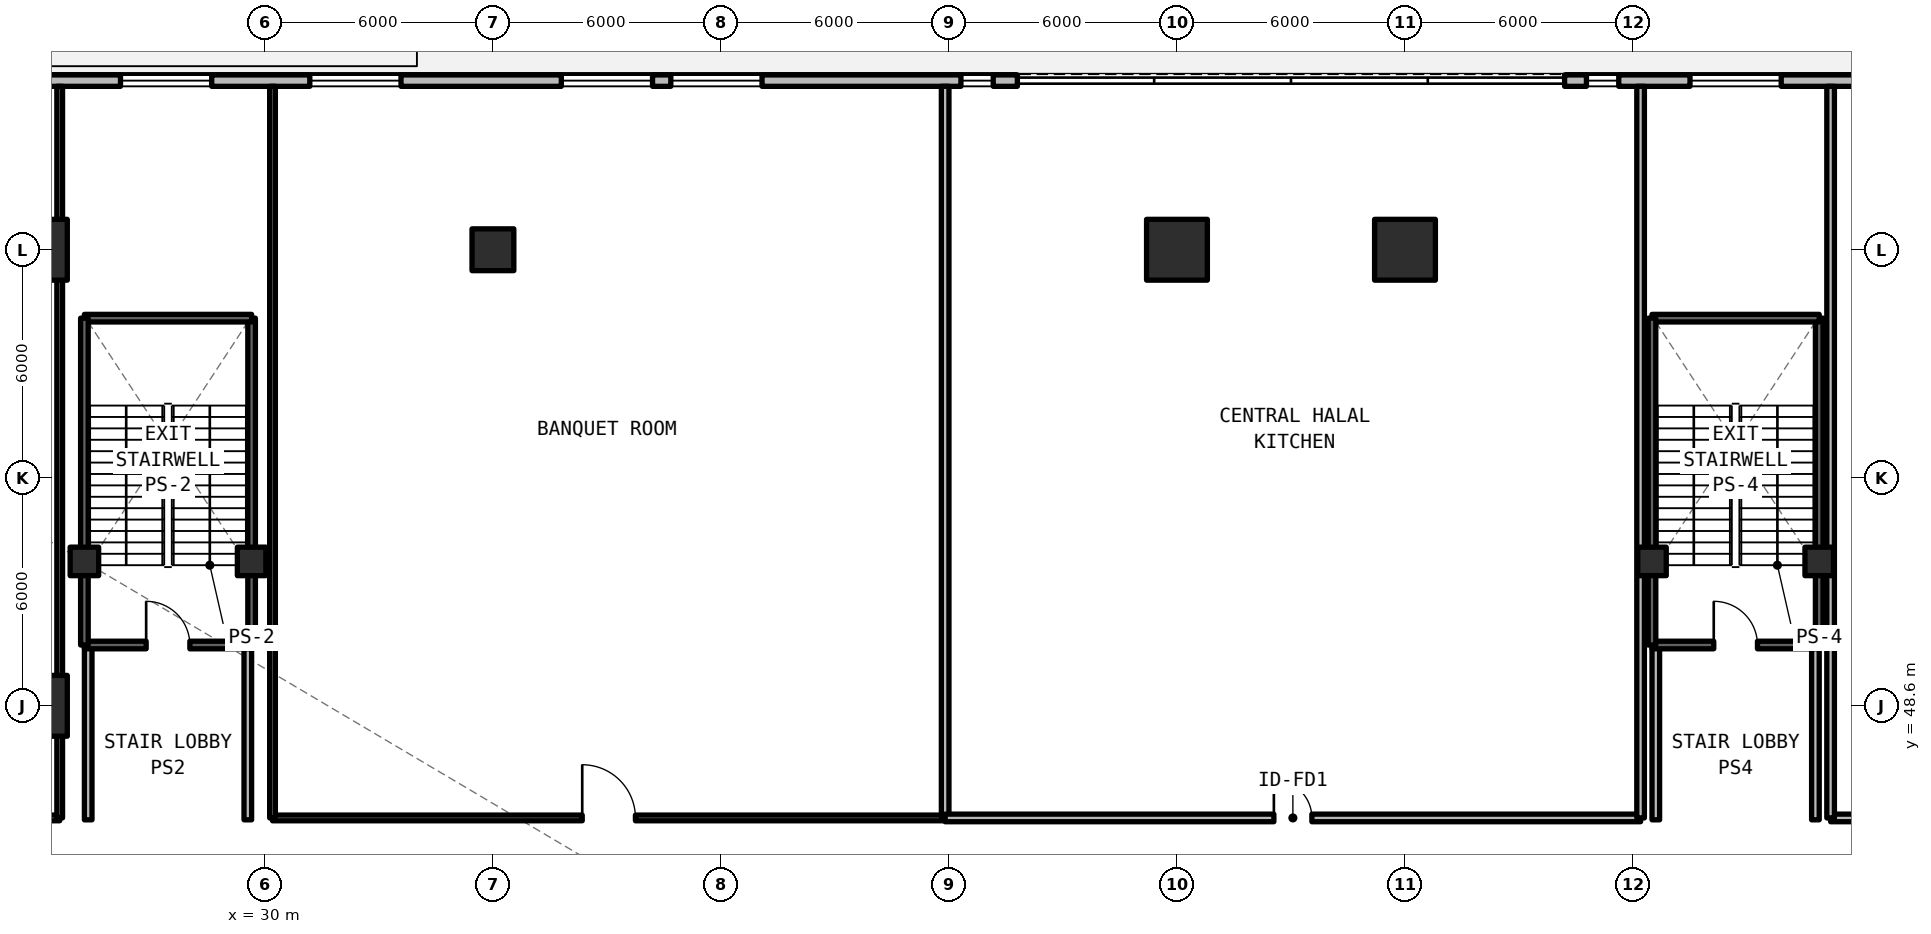
"""IFC4 building model, lengths in metres.
Left out: names, types, materials, properties, quantities, classifications, styles, units other than length and angle.
Written with IfcOpenShell. Run it as: python <this file> out.ifc"""

import sys

from ifc_helpers import new_model, si_unit, direction, frame, frame_2d, origin, origin_2d, place, context, subcontext, project, spatial, rectangle, circle, extrude, element, fill, save


model = new_model("IFC4")
c1 = context("Model", 3, precision=1e-05, world=origin(), true_north=direction((0.0, 1.0)))
c2 = subcontext(c1, "Body", "Model", "MODEL_VIEW")
j1 = project(units=[si_unit("LENGTHUNIT", "METRE"), si_unit("PLANEANGLEUNIT", "RADIAN")], contexts=[c1])
p1 = place(None, origin())
s1 = spatial("IfcSite", under=j1, at=p1, CompositionType="ELEMENT")
p2 = place(p1, origin())
s2 = spatial("IfcBuilding", under=s1, at=p2, CompositionType="ELEMENT")
p3 = place(p2, frame((0.0, 0.0, 9.9)))
s3 = spatial("IfcBuildingStorey", under=s2, at=p3, CompositionType="ELEMENT", Elevation=9.9)
p4 = place(p3, frame((24.0, 60.6, 0.0), z_axis=(0.0, 0.0, 1.0), x_axis=(1.0, 0.0, 0.0)))
e1 = element("IfcColumn", 1, at=p4, inside=s3, PredefinedType="COLUMN", context=c2, shape_type="SweptSolid", body=[
    extrude(rectangle(XDim=1.6, YDim=1.6, at=origin_2d()), origin(), (0.0, 0.0, 1.0), 4.95),
])
p5 = place(p3, frame((36.0, 60.6, 0.0), z_axis=(0.0, 0.0, 1.0), x_axis=(1.0, 0.0, 0.0)))
e2 = element("IfcColumn", 2, at=p5, inside=s3, PredefinedType="COLUMN", context=c2, shape_type="SweptSolid", body=[
    extrude(circle(Radius=0.55, at=origin_2d()), origin(), (0.0, 0.0, 1.0), 4.95),
])
for number, where, z_axis, x_axis in (
    (3, (54.0, 60.6, 0.0), (0.0, 0.0, 1.0), (1.0, 0.0, 0.0)),
    (4, (60.0, 60.6, 0.0), (0.0, 0.0, 1.0), (1.0, 0.0, 0.0)),
    (5, (24.0, 48.6, 0.0), (0.0, 0.0, 1.0), (1.0, 0.0, 0.0)),
):
    element("IfcColumn", number, at=place(p3, frame(where, z_axis=z_axis, x_axis=x_axis)), inside=s3, PredefinedType="COLUMN", context=c2, shape_type="SweptSolid", body=[
        extrude(rectangle(XDim=1.6, YDim=1.6, at=origin_2d()), origin(), (0.0, 0.0, 1.0), 4.95),
    ])
for number, where, z_axis, x_axis in (
    (6, (25.25, 52.4, 0.0), (0.0, 0.0, 1.0), (1.0, 0.0, 0.0)),
    (7, (29.65, 52.4, 0.0), (0.0, 0.0, 1.0), (1.0, 0.0, 0.0)),
    (8, (66.5, 52.4, 0.0), (0.0, 0.0, 1.0), (1.0, 0.0, 0.0)),
    (9, (70.9, 52.4, 0.0), (0.0, 0.0, 1.0), (1.0, 0.0, 0.0)),
):
    element("IfcColumn", number, at=place(p3, frame(where, z_axis=z_axis, x_axis=x_axis)), inside=s3, PredefinedType="COLUMN", context=c2, shape_type="SweptSolid", body=[
        extrude(rectangle(XDim=0.75, YDim=0.75, at=origin_2d()), origin(), (0.0, 0.0, 1.0), 4.95),
    ])
p6 = place(p3, frame((108.538, 65.05, 0.0), z_axis=(0.0, 0.0, 1.0), x_axis=(-1.0, 0.0, 0.0)))
e10 = element("IfcWall", 10, at=p6, inside=s3, PredefinedType="SOLIDWALL", context=c2, shape_type="SweptSolid", body=[
    extrude(rectangle(XDim=44.338, YDim=0.3, at=frame_2d((22.169, 0.0))), origin(), (0.0, 0.0, 1.0), 4.67),
])
p7 = place(p6, frame((7.75, 0.0, 0.0)))
e11 = element("IfcOpeningElement", 11, at=p7, cuts=e10, PredefinedType="OPENING", context=c2, shape_type="SweptSolid", body=[
    extrude(rectangle(XDim=1.5, YDim=2.2, at=frame_2d((0.75, 1.1))), frame((0.0, 0.16, 0.0), z_axis=(0.0, -1.0, 0.0), x_axis=(1.0, 0.0, 0.0)), (0.0, 0.0, 1.0), 0.32),
])
p8 = place(p6, frame((42.913, 0.0, 0.78)))
e12 = element("IfcOpeningElement", 12, at=p8, cuts=e10, PredefinedType="OPENING", context=c2, shape_type="SweptSolid", body=[
    extrude(rectangle(XDim=0.85, YDim=1.65, at=frame_2d((0.425, 0.825))), frame((0.0, 0.16, 0.0), z_axis=(0.0, -1.0, 0.0), x_axis=(1.0, 0.0, 0.0)), (0.0, 0.0, 1.0), 0.32),
])
p9 = place(p6, frame((29.738, 0.0, 0.78)))
e13 = element("IfcOpeningElement", 13, at=p9, cuts=e10, PredefinedType="OPENING", context=c2, shape_type="SweptSolid", body=[
    extrude(rectangle(XDim=2.4, YDim=1.66, at=frame_2d((1.2, 0.83))), frame((0.0, 0.16, 0.0), z_axis=(0.0, -1.0, 0.0), x_axis=(1.0, 0.0, 0.0)), (0.0, 0.0, 1.0), 0.32),
])
p10 = place(p6, frame((38.638, 0.0, 0.78)))
e14 = element("IfcOpeningElement", 14, at=p10, cuts=e10, PredefinedType="OPENING", context=c2, shape_type="SweptSolid", body=[
    extrude(rectangle(XDim=2.4, YDim=1.66, at=frame_2d((1.2, 0.83))), frame((0.0, 0.16, 0.0), z_axis=(0.0, -1.0, 0.0), x_axis=(1.0, 0.0, 0.0)), (0.0, 0.0, 1.0), 0.32),
])
p11 = place(p6, frame((16.219, 0.0, 0.78)))
e15 = element("IfcOpeningElement", 15, at=p11, cuts=e10, PredefinedType="OPENING", context=c2, shape_type="SweptSolid", body=[
    extrude(rectangle(XDim=2.4, YDim=1.66, at=frame_2d((1.2, 0.83))), frame((0.0, 0.16, 0.0), z_axis=(0.0, -1.0, 0.0), x_axis=(1.0, 0.0, 0.0)), (0.0, 0.0, 1.0), 0.32),
])
p12 = place(p6, frame((25.719, 0.0, 0.78)))
e16 = element("IfcOpeningElement", 16, at=p12, cuts=e10, PredefinedType="OPENING", context=c2, shape_type="SweptSolid", body=[
    extrude(rectangle(XDim=2.4, YDim=1.66, at=frame_2d((1.2, 0.83))), frame((0.0, 0.16, 0.0), z_axis=(0.0, -1.0, 0.0), x_axis=(1.0, 0.0, 0.0)), (0.0, 0.0, 1.0), 0.32),
])
p13 = place(p3, frame((49.8, 65.05, 0.0), z_axis=(0.0, 0.0, 1.0), x_axis=(-1.0, 0.0, 0.0)))
e17 = element("IfcWall", 17, at=p13, inside=s3, PredefinedType="SOLIDWALL", context=c2, shape_type="SweptSolid", body=[
    extrude(rectangle(XDim=44.338, YDim=0.3, at=frame_2d((22.169, 0.0))), origin(), (0.0, 0.0, 1.0), 4.67),
])
p14 = place(p13, frame((9.6, 0.0, 0.78)))
e18 = element("IfcOpeningElement", 18, at=p14, cuts=e17, PredefinedType="OPENING", context=c2, shape_type="SweptSolid", body=[
    extrude(rectangle(XDim=2.4, YDim=1.66, at=frame_2d((1.2, 0.83))), frame((0.0, 0.16, 0.0), z_axis=(0.0, -1.0, 0.0), x_axis=(1.0, 0.0, 0.0)), (0.0, 0.0, 1.0), 0.32),
])
p15 = place(p13, frame((0.635, 0.0, 0.78)))
e19 = element("IfcOpeningElement", 19, at=p15, cuts=e17, PredefinedType="OPENING", context=c2, shape_type="SweptSolid", body=[
    extrude(rectangle(XDim=0.85, YDim=1.65, at=frame_2d((0.425, 0.825))), frame((0.0, 0.16, 0.0), z_axis=(0.0, -1.0, 0.0), x_axis=(1.0, 0.0, 0.0)), (0.0, 0.0, 1.0), 0.32),
])
p16 = place(p13, frame((33.1, 0.0, 0.78)))
e20 = element("IfcOpeningElement", 20, at=p16, cuts=e17, PredefinedType="OPENING", context=c2, shape_type="SweptSolid", body=[
    extrude(rectangle(XDim=2.4, YDim=1.66, at=frame_2d((1.2, 0.83))), frame((0.0, 0.16, 0.0), z_axis=(0.0, -1.0, 0.0), x_axis=(1.0, 0.0, 0.0)), (0.0, 0.0, 1.0), 0.32),
])
p17 = place(p13, frame((21.2, 0.0, 0.78)))
e21 = element("IfcOpeningElement", 21, at=p17, cuts=e17, PredefinedType="OPENING", context=c2, shape_type="SweptSolid", body=[
    extrude(rectangle(XDim=2.4, YDim=1.66, at=frame_2d((1.2, 0.83))), frame((0.0, 0.16, 0.0), z_axis=(0.0, -1.0, 0.0), x_axis=(1.0, 0.0, 0.0)), (0.0, 0.0, 1.0), 0.32),
])
p18 = place(p13, frame((6.719, 0.0, 0.78)))
e22 = element("IfcOpeningElement", 22, at=p18, cuts=e17, PredefinedType="OPENING", context=c2, shape_type="SweptSolid", body=[
    extrude(rectangle(XDim=2.4, YDim=1.66, at=frame_2d((1.2, 0.83))), frame((0.0, 0.16, 0.0), z_axis=(0.0, -1.0, 0.0), x_axis=(1.0, 0.0, 0.0)), (0.0, 0.0, 1.0), 0.32),
])
p19 = place(p13, frame((16.219, 0.0, 0.78)))
e23 = element("IfcOpeningElement", 23, at=p19, cuts=e17, PredefinedType="OPENING", context=c2, shape_type="SweptSolid", body=[
    extrude(rectangle(XDim=2.4, YDim=1.66, at=frame_2d((1.2, 0.83))), frame((0.0, 0.16, 0.0), z_axis=(0.0, -1.0, 0.0), x_axis=(1.0, 0.0, 0.0)), (0.0, 0.0, 1.0), 0.32),
])
for number, where, z_axis, x_axis in (
    (24, (25.35, 45.6, 0.0), (0.0, 0.0, 1.0), (0.0, 1.0, 0.0)),
    (25, (29.55, 45.6, 0.0), (0.0, 0.0, 1.0), (0.0, 1.0, 0.0)),
    (26, (66.6, 45.6, 0.0), (0.0, 0.0, 1.0), (0.0, 1.0, 0.0)),
    (27, (70.8, 45.6, 0.0), (0.0, 0.0, 1.0), (0.0, 1.0, 0.0)),
):
    element("IfcWall", number, at=place(p3, frame(where, z_axis=z_axis, x_axis=x_axis)), inside=s3, PredefinedType="SOLIDWALL", context=c2, shape_type="SweptSolid", body=[
        extrude(rectangle(XDim=4.6, YDim=0.2, at=frame_2d((2.3, 0.0))), origin(), (0.0, 0.0, 1.0), 3.89),
    ])
p20 = place(p3, frame((30.2, 45.65, 0.0), z_axis=(0.0, 0.0, 1.0), x_axis=(1.0, 0.0, 0.0)))
e28 = element("IfcWall", 28, at=p20, inside=s3, PredefinedType="SOLIDWALL", context=c2, shape_type="SweptSolid", body=[
    extrude(rectangle(XDim=17.7, YDim=0.15, at=frame_2d((8.85, 0.0))), origin(), (0.0, 0.0, 1.0), 3.89),
])
p21 = place(p20, frame((8.15, 0.0, 0.0)))
e29 = element("IfcOpeningElement", 29, at=p21, cuts=e28, PredefinedType="OPENING", context=c2, shape_type="SweptSolid", body=[
    extrude(rectangle(XDim=1.4, YDim=2.15, at=frame_2d((0.7, 1.075))), frame((0.0, 0.085, 0.0), z_axis=(0.0, -1.0, 0.0), x_axis=(1.0, 0.0, 0.0)), (0.0, 0.0, 1.0), 0.17),
])
p22 = place(p3, frame((30.2, 45.65, 0.0), z_axis=(0.0, 0.0, 1.0), x_axis=(0.0, 1.0, 0.0)))
e30 = element("IfcWall", 30, at=p22, inside=s3, PredefinedType="SOLIDWALL", context=c2, shape_type="SweptSolid", body=[
    extrude(rectangle(XDim=19.25, YDim=0.15, at=frame_2d((9.625, 0.0))), origin(), (0.0, 0.0, 1.0), 3.89),
])
p23 = place(p3, frame((47.9, 45.65, 0.0), z_axis=(0.0, 0.0, 1.0), x_axis=(0.0, 1.0, 0.0)))
e31 = element("IfcWall", 31, at=p23, inside=s3, PredefinedType="SOLIDWALL", context=c2, shape_type="SweptSolid", body=[
    extrude(rectangle(XDim=19.25, YDim=0.2, at=frame_2d((9.625, 0.0))), origin(), (0.0, 0.0, 1.0), 3.89),
])
p24 = place(p3, frame((47.9, 45.65, 0.0), z_axis=(0.0, 0.0, 1.0), x_axis=(1.0, 0.0, 0.0)))
e32 = element("IfcWall", 32, at=p24, inside=s3, PredefinedType="SOLIDWALL", context=c2, shape_type="SweptSolid", body=[
    extrude(rectangle(XDim=18.3, YDim=0.2, at=frame_2d((9.15, 0.0))), origin(), (0.0, 0.0, 1.0), 3.89),
])
p25 = place(p24, frame((8.65, 0.0, 0.0)))
e33 = element("IfcOpeningElement", 33, at=p25, cuts=e32, PredefinedType="OPENING", context=c2, shape_type="SweptSolid", body=[
    extrude(rectangle(XDim=1.0, YDim=2.15, at=frame_2d((0.5, 1.075))), frame((0.0, 0.11, 0.0), z_axis=(0.0, -1.0, 0.0), x_axis=(1.0, 0.0, 0.0)), (0.0, 0.0, 1.0), 0.22),
])
p26 = place(p3, frame((66.2, 45.65, 0.0), z_axis=(0.0, 0.0, 1.0), x_axis=(0.0, 1.0, 0.0)))
e34 = element("IfcWall", 34, at=p26, inside=s3, PredefinedType="SOLIDWALL", context=c2, shape_type="SweptSolid", body=[
    extrude(rectangle(XDim=19.25, YDim=0.2, at=frame_2d((9.625, 0.0))), origin(), (0.0, 0.0, 1.0), 3.89),
])
p27 = place(p3, frame((71.2, 45.65, 0.0), z_axis=(0.0, 0.0, 1.0), x_axis=(1.0, 0.0, 0.0)))
e35 = element("IfcWall", 35, at=p27, inside=s3, PredefinedType="SOLIDWALL", context=c2, shape_type="SweptSolid", body=[
    extrude(rectangle(XDim=12.8, YDim=0.2, at=frame_2d((6.4, 0.0))), origin(), (0.0, 0.0, 1.0), 3.89),
])
p28 = place(p27, frame((5.9, 0.0, 0.0)))
e36 = element("IfcOpeningElement", 36, at=p28, cuts=e35, PredefinedType="OPENING", context=c2, shape_type="SweptSolid", body=[
    extrude(rectangle(XDim=1.0, YDim=2.15, at=frame_2d((0.5, 1.075))), frame((0.0, 0.11, 0.0), z_axis=(0.0, -1.0, 0.0), x_axis=(1.0, 0.0, 0.0)), (0.0, 0.0, 1.0), 0.22),
])
p29 = place(p3, frame((71.2, 45.65, 0.0), z_axis=(0.0, 0.0, 1.0), x_axis=(0.0, 1.0, 0.0)))
e37 = element("IfcWall", 37, at=p29, inside=s3, PredefinedType="SOLIDWALL", context=c2, shape_type="SweptSolid", body=[
    extrude(rectangle(XDim=19.25, YDim=0.2, at=frame_2d((9.625, 0.0))), origin(), (0.0, 0.0, 1.0), 3.89),
])
p30 = place(p3, frame((6.4, 45.65, 0.0), z_axis=(0.0, 0.0, 1.0), x_axis=(1.0, 0.0, 0.0)))
e38 = element("IfcWall", 38, at=p30, inside=s3, PredefinedType="SOLIDWALL", context=c2, shape_type="SweptSolid", body=[
    extrude(rectangle(XDim=18.2, YDim=0.15, at=frame_2d((9.1, 0.0))), origin(), (0.0, 0.0, 1.0), 3.89),
])
p31 = place(p30, frame((8.55, 0.0, 0.0)))
e39 = element("IfcOpeningElement", 39, at=p31, cuts=e38, PredefinedType="OPENING", context=c2, shape_type="SweptSolid", body=[
    extrude(rectangle(XDim=1.1, YDim=2.15, at=frame_2d((0.55, 1.075))), frame((0.0, 0.085, 0.0), z_axis=(0.0, -1.0, 0.0), x_axis=(1.0, 0.0, 0.0)), (0.0, 0.0, 1.0), 0.17),
])
p32 = place(p3, frame((24.6, 45.65, 0.0), z_axis=(0.0, 0.0, 1.0), x_axis=(0.0, 1.0, 0.0)))
e40 = element("IfcWall", 40, at=p32, inside=s3, PredefinedType="SOLIDWALL", context=c2, shape_type="SweptSolid", body=[
    extrude(rectangle(XDim=19.25, YDim=0.15, at=frame_2d((9.625, 0.0))), origin(), (0.0, 0.0, 1.0), 3.89),
])
p33 = place(p3, frame((25.25, 50.2, 0.0), z_axis=(0.0, 0.0, 1.0), x_axis=(1.0, 0.0, 0.0)))
e41 = element("IfcWall", 41, at=p33, inside=s3, PredefinedType="SOLIDWALL", context=c2, shape_type="SweptSolid", body=[
    extrude(rectangle(XDim=4.4, YDim=0.2, at=frame_2d((2.2, 0.0))), origin(), (0.0, 0.0, 1.0), 4.95),
])
p34 = place(p33, frame((1.625, 0.0, 0.0)))
e42 = element("IfcOpeningElement", 42, at=p34, cuts=e41, PredefinedType="OPENING", context=c2, shape_type="SweptSolid", body=[
    extrude(rectangle(XDim=1.15, YDim=2.15, at=frame_2d((0.575, 1.075))), frame((0.0, 0.11, 0.0), z_axis=(0.0, -1.0, 0.0), x_axis=(1.0, 0.0, 0.0)), (0.0, 0.0, 1.0), 0.22),
])
p35 = place(p3, frame((29.65, 50.2, 0.0), z_axis=(0.0, 0.0, 1.0), x_axis=(0.0, 1.0, 0.0)))
e43 = element("IfcWall", 43, at=p35, inside=s3, PredefinedType="SOLIDWALL", context=c2, shape_type="SweptSolid", body=[
    extrude(rectangle(XDim=8.6, YDim=0.2, at=frame_2d((4.3, 0.0))), origin(), (0.0, 0.0, 1.0), 4.95),
])
p36 = place(p3, frame((29.65, 58.8, 0.0), z_axis=(0.0, 0.0, 1.0), x_axis=(-1.0, 0.0, 0.0)))
e44 = element("IfcWall", 44, at=p36, inside=s3, PredefinedType="SOLIDWALL", context=c2, shape_type="SweptSolid", body=[
    extrude(rectangle(XDim=4.4, YDim=0.2, at=frame_2d((2.2, 0.0))), origin(), (0.0, 0.0, 1.0), 4.95),
])
p37 = place(p3, frame((25.25, 58.8, 0.0), z_axis=(0.0, 0.0, 1.0), x_axis=(0.0, -1.0, 0.0)))
e45 = element("IfcWall", 45, at=p37, inside=s3, PredefinedType="SOLIDWALL", context=c2, shape_type="SweptSolid", body=[
    extrude(rectangle(XDim=8.6, YDim=0.2, at=frame_2d((4.3, 0.0))), origin(), (0.0, 0.0, 1.0), 4.95),
])
p38 = place(p3, frame((66.5, 50.2, 0.0), z_axis=(0.0, 0.0, 1.0), x_axis=(1.0, 0.0, 0.0)))
e46 = element("IfcWall", 46, at=p38, inside=s3, PredefinedType="SOLIDWALL", context=c2, shape_type="SweptSolid", body=[
    extrude(rectangle(XDim=4.4, YDim=0.2, at=frame_2d((2.2, 0.0))), origin(), (0.0, 0.0, 1.0), 4.95),
])
p39 = place(p38, frame((1.625, 0.0, 0.0)))
e47 = element("IfcOpeningElement", 47, at=p39, cuts=e46, PredefinedType="OPENING", context=c2, shape_type="SweptSolid", body=[
    extrude(rectangle(XDim=1.15, YDim=2.15, at=frame_2d((0.575, 1.075))), frame((0.0, 0.11, 0.0), z_axis=(0.0, -1.0, 0.0), x_axis=(1.0, 0.0, 0.0)), (0.0, 0.0, 1.0), 0.22),
])
p40 = place(p3, frame((70.9, 50.2, 0.0), z_axis=(0.0, 0.0, 1.0), x_axis=(0.0, 1.0, 0.0)))
e48 = element("IfcWall", 48, at=p40, inside=s3, PredefinedType="SOLIDWALL", context=c2, shape_type="SweptSolid", body=[
    extrude(rectangle(XDim=8.6, YDim=0.2, at=frame_2d((4.3, 0.0))), origin(), (0.0, 0.0, 1.0), 4.95),
])
p41 = place(p3, frame((70.9, 58.8, 0.0), z_axis=(0.0, 0.0, 1.0), x_axis=(-1.0, 0.0, 0.0)))
e49 = element("IfcWall", 49, at=p41, inside=s3, PredefinedType="SOLIDWALL", context=c2, shape_type="SweptSolid", body=[
    extrude(rectangle(XDim=4.4, YDim=0.2, at=frame_2d((2.2, 0.0))), origin(), (0.0, 0.0, 1.0), 4.95),
])
p42 = place(p3, frame((66.5, 58.8, 0.0), z_axis=(0.0, 0.0, 1.0), x_axis=(0.0, -1.0, 0.0)))
e50 = element("IfcWall", 50, at=p42, inside=s3, PredefinedType="SOLIDWALL", context=c2, shape_type="SweptSolid", body=[
    extrude(rectangle(XDim=8.6, YDim=0.2, at=frame_2d((4.3, 0.0))), origin(), (0.0, 0.0, 1.0), 4.95),
])
p43 = place(p8, origin())
e51 = element("IfcWindow", 51, at=p43, inside=s3, PartitioningType="SINGLE_PANEL", PredefinedType="WINDOW", context=c2, shape_type="SweptSolid", body=[
    extrude(rectangle(XDim=0.85, YDim=1.65, at=frame_2d((0.425, 0.825))), frame((0.0, 0.03, 0.0), z_axis=(0.0, -1.0, 0.0), x_axis=(1.0, 0.0, 0.0)), (0.0, 0.0, 1.0), 0.06),
])
fill(e12, e51)
p44 = place(p10, origin())
e52 = element("IfcWindow", 52, at=p44, inside=s3, PartitioningType="SINGLE_PANEL", PredefinedType="WINDOW", context=c2, shape_type="SweptSolid", body=[
    extrude(rectangle(XDim=2.4, YDim=1.66, at=frame_2d((1.2, 0.83))), frame((0.0, 0.03, 0.0), z_axis=(0.0, -1.0, 0.0), x_axis=(1.0, 0.0, 0.0)), (0.0, 0.0, 1.0), 0.06),
])
fill(e14, e52)
p45 = place(p14, origin())
e53 = element("IfcWindow", 53, at=p45, inside=s3, PartitioningType="SINGLE_PANEL", PredefinedType="WINDOW", context=c2, shape_type="SweptSolid", body=[
    extrude(rectangle(XDim=2.4, YDim=1.66, at=frame_2d((1.2, 0.83))), frame((0.0, 0.03, 0.0), z_axis=(0.0, -1.0, 0.0), x_axis=(1.0, 0.0, 0.0)), (0.0, 0.0, 1.0), 0.06),
])
fill(e18, e53)
p46 = place(p15, origin())
e54 = element("IfcWindow", 54, at=p46, inside=s3, PartitioningType="SINGLE_PANEL", PredefinedType="WINDOW", context=c2, shape_type="SweptSolid", body=[
    extrude(rectangle(XDim=0.85, YDim=1.65, at=frame_2d((0.425, 0.825))), frame((0.0, 0.03, 0.0), z_axis=(0.0, -1.0, 0.0), x_axis=(1.0, 0.0, 0.0)), (0.0, 0.0, 1.0), 0.06),
])
fill(e19, e54)
p47 = place(p17, origin())
e55 = element("IfcWindow", 55, at=p47, inside=s3, PartitioningType="SINGLE_PANEL", PredefinedType="WINDOW", context=c2, shape_type="SweptSolid", body=[
    extrude(rectangle(XDim=2.4, YDim=1.66, at=frame_2d((1.2, 0.83))), frame((0.0, 0.03, 0.0), z_axis=(0.0, -1.0, 0.0), x_axis=(1.0, 0.0, 0.0)), (0.0, 0.0, 1.0), 0.06),
])
fill(e21, e55)
p48 = place(p18, origin())
e56 = element("IfcWindow", 56, at=p48, inside=s3, PartitioningType="SINGLE_PANEL", PredefinedType="WINDOW", context=c2, shape_type="SweptSolid", body=[
    extrude(rectangle(XDim=2.4, YDim=1.66, at=frame_2d((1.2, 0.83))), frame((0.0, 0.03, 0.0), z_axis=(0.0, -1.0, 0.0), x_axis=(1.0, 0.0, 0.0)), (0.0, 0.0, 1.0), 0.06),
])
fill(e22, e56)
p49 = place(p19, origin())
e57 = element("IfcWindow", 57, at=p49, inside=s3, PartitioningType="SINGLE_PANEL", PredefinedType="WINDOW", context=c2, shape_type="SweptSolid", body=[
    extrude(rectangle(XDim=2.4, YDim=1.66, at=frame_2d((1.2, 0.83))), frame((0.0, 0.03, 0.0), z_axis=(0.0, -1.0, 0.0), x_axis=(1.0, 0.0, 0.0)), (0.0, 0.0, 1.0), 0.06),
])
fill(e23, e57)
p50 = place(p21, origin())
e58 = element("IfcDoor", 58, at=p50, inside=s3, OperationType="SINGLE_SWING_RIGHT", PredefinedType="DOOR", context=c2, shape_type="SweptSolid", body=[
    extrude(rectangle(XDim=1.4, YDim=2.15, at=frame_2d((0.7, 1.075))), frame((0.0, 0.025, 0.0), z_axis=(0.0, -1.0, 0.0), x_axis=(1.0, 0.0, 0.0)), (0.0, 0.0, 1.0), 0.05),
])
fill(e29, e58)
p51 = place(p25, origin())
e59 = element("IfcDoor", 59, at=p51, inside=s3, OperationType="SINGLE_SWING_LEFT", PredefinedType="DOOR", context=c2, shape_type="SweptSolid", body=[
    extrude(rectangle(XDim=1.0, YDim=2.15, at=frame_2d((0.5, 1.075))), frame((0.0, 0.025, 0.0), z_axis=(0.0, -1.0, 0.0), x_axis=(1.0, 0.0, 0.0)), (0.0, 0.0, 1.0), 0.05),
])
fill(e33, e59)
p52 = place(p34, origin())
e60 = element("IfcDoor", 60, at=p52, inside=s3, OperationType="SINGLE_SWING_LEFT", PredefinedType="DOOR", context=c2, shape_type="SweptSolid", body=[
    extrude(rectangle(XDim=1.15, YDim=2.15, at=frame_2d((0.575, 1.075))), frame((0.0, 0.025, 0.0), z_axis=(0.0, -1.0, 0.0), x_axis=(1.0, 0.0, 0.0)), (0.0, 0.0, 1.0), 0.05),
])
fill(e42, e60)
p53 = place(p39, origin())
e61 = element("IfcDoor", 61, at=p53, inside=s3, OperationType="SINGLE_SWING_LEFT", PredefinedType="DOOR", context=c2, shape_type="SweptSolid", body=[
    extrude(rectangle(XDim=1.15, YDim=2.15, at=frame_2d((0.575, 1.075))), frame((0.0, 0.025, 0.0), z_axis=(0.0, -1.0, 0.0), x_axis=(1.0, 0.0, 0.0)), (0.0, 0.0, 1.0), 0.05),
])
fill(e47, e61)
save(model, sys.argv[1])
